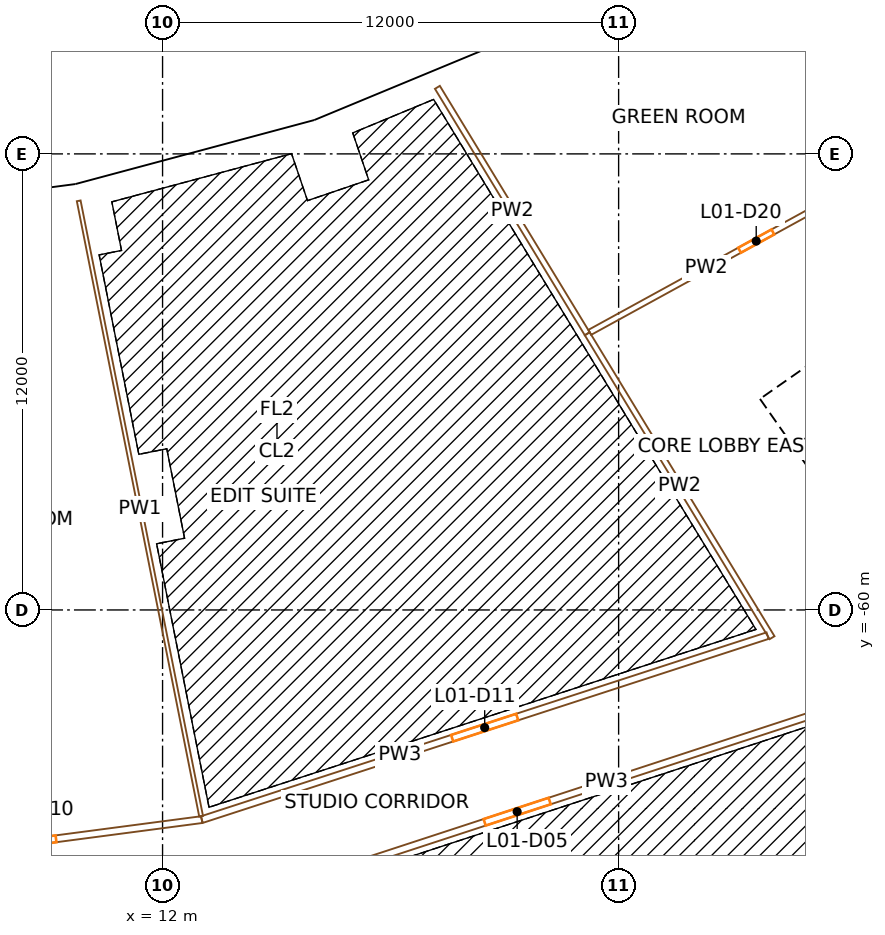
"""IFC4 building model, lengths in metres.
Left out: names, types, materials, properties, quantities, classifications, styles, units other than length and angle.
Written with IfcOpenShell. Run it as: python <this file> out.ifc"""

import sys

from ifc_helpers import new_model, si_unit, direction, frame, frame_2d, origin, origin_2d, place, context, subcontext, project, spatial, rectangle, extrude, element, fill, save


model = new_model("IFC4")
c1 = context("Model", 3, precision=1e-05, world=origin(), true_north=direction((0.0, 1.0)))
c2 = subcontext(c1, "Body", "Model", "MODEL_VIEW")
j1 = project(units=[si_unit("LENGTHUNIT", "METRE"), si_unit("PLANEANGLEUNIT", "RADIAN")], contexts=[c1])
p1 = place(None, origin())
s1 = spatial("IfcSite", under=j1, at=p1, CompositionType="ELEMENT")
p2 = place(p1, origin())
s2 = spatial("IfcBuilding", under=s1, at=p2, CompositionType="ELEMENT")
p3 = place(p2, frame((0.0, 0.0, 9.0)))
s3 = spatial("IfcBuildingStorey", under=s2, at=p3, CompositionType="ELEMENT", Elevation=9.0)
p4 = place(p3, frame((9.901, -49.775, 0.0), z_axis=(0.0, 0.0, 1.0), x_axis=(0.980785280403, 0.195090322016, 0.0)))
e1 = element("IfcColumn", 1, at=p4, inside=s3, PredefinedType="COLUMN", context=c2, shape_type="SweptSolid", body=[
    extrude(rectangle(XDim=1.1, YDim=1.3, at=origin_2d()), origin(), (0.0, 0.0, 1.0), 9.0),
])
p5 = place(p3, frame((11.364, -57.131, 0.0), z_axis=(0.0, 0.0, 1.0), x_axis=(0.980785280403, 0.195090322016, 0.0)))
e2 = element("IfcColumn", 2, at=p5, inside=s3, PredefinedType="COLUMN", context=c2, shape_type="SweptSolid", body=[
    extrude(rectangle(XDim=1.4, YDim=1.8, at=origin_2d()), origin(), (0.0, 0.0, 1.0), 9.0),
])
p6 = place(p3, frame((16.313, -48.057, 0.0), z_axis=(0.0, 0.0, 1.0), x_axis=(0.946930129495, 0.321439465303, 0.0)))
e3 = element("IfcColumn", 3, at=p6, inside=s3, PredefinedType="COLUMN", context=c2, shape_type="SweptSolid", body=[
    extrude(rectangle(XDim=1.1, YDim=1.3, at=origin_2d()), origin(), (0.0, 0.0, 1.0), 9.0),
])
p7 = place(p3, frame((18.724, -55.159, 0.0), z_axis=(0.0, 0.0, 1.0), x_axis=(0.946930129495, 0.321439465303, 0.0)))
e4 = element("IfcColumn", 4, at=p7, inside=s3, PredefinedType="COLUMN", context=c2, shape_type="SweptSolid", body=[
    extrude(rectangle(XDim=1.4, YDim=1.8, at=origin_2d()), origin(), (0.0, 0.0, 1.0), 9.0),
])
p8 = place(p3, frame((22.446, -45.516, 0.0), z_axis=(0.0, 0.0, 1.0), x_axis=(0.896872741533, 0.442288690219, 0.0)))
e5 = element("IfcColumn", 5, at=p8, inside=s3, PredefinedType="COLUMN", context=c2, shape_type="SweptSolid", body=[
    extrude(rectangle(XDim=1.1, YDim=1.3, at=origin_2d()), origin(), (0.0, 0.0, 1.0), 9.0),
])
p9 = place(p3, frame((25.763, -52.243, 0.0), z_axis=(0.0, 0.0, 1.0), x_axis=(0.896872741533, 0.442288690219, 0.0)))
e6 = element("IfcColumn", 6, at=p9, inside=s3, PredefinedType="COLUMN", context=c2, shape_type="SweptSolid", body=[
    extrude(rectangle(XDim=1.4, YDim=1.8, at=origin_2d()), origin(), (0.0, 0.0, 1.0), 9.0),
])
p10 = place(p3, frame((36.717, -66.337, 0.0), z_axis=(0.0, 0.0, 1.0), x_axis=(-0.573577477574, 0.819151315216, 0.0)))
e7 = element("IfcWall", 7, at=p10, inside=s3, PredefinedType="SHEAR", context=c2, shape_type="SweptSolid", body=[
    extrude(rectangle(XDim=14.8, YDim=0.9, at=frame_2d((7.4, 0.0))), origin(), (0.0, 0.0, 1.0), 8.6),
])
p11 = place(p10, frame((6.2, 0.0, 0.0)))
e8 = element("IfcOpeningElement", 8, at=p11, cuts=e7, PredefinedType="OPENING", context=c2, shape_type="SweptSolid", body=[
    extrude(rectangle(XDim=2.4, YDim=2.1, at=frame_2d((1.2, 1.05))), frame((0.0, 0.46, 0.0), z_axis=(0.0, -1.0, 0.0), x_axis=(1.0, 0.0, 0.0)), (0.0, 0.0, 1.0), 0.92),
])
p12 = place(p3, frame((28.854, -54.324, 0.0), z_axis=(0.0, 0.0, 1.0), x_axis=(0.819145767589, 0.573585400304, 0.0)))
e9 = element("IfcWall", 9, at=p12, inside=s3, PredefinedType="SHEAR", context=c2, shape_type="SweptSolid", body=[
    extrude(rectangle(XDim=15.045, YDim=0.9, at=frame_2d((7.523, 0.0))), origin(), (0.0, 0.0, 1.0), 8.6),
])
p13 = place(p12, frame((0.85, 0.0, 0.0)))
e10 = element("IfcOpeningElement", 10, at=p13, cuts=e9, PredefinedType="OPENING", context=c2, shape_type="SweptSolid", body=[
    extrude(rectangle(XDim=1.0, YDim=2.1, at=frame_2d((0.5, 1.05))), frame((0.0, 0.46, 0.0), z_axis=(0.0, -1.0, 0.0), x_axis=(1.0, 0.0, 0.0)), (0.0, 0.0, 1.0), 0.92),
])
p14 = place(p12, frame((3.575, 0.0, 0.0)))
e11 = element("IfcOpeningElement", 11, at=p14, cuts=e9, PredefinedType="OPENING", context=c2, shape_type="SweptSolid", body=[
    extrude(rectangle(XDim=1.0, YDim=2.1, at=frame_2d((0.5, 1.05))), frame((0.0, 0.46, 0.0), z_axis=(0.0, -1.0, 0.0), x_axis=(1.0, 0.0, 0.0)), (0.0, 0.0, 1.0), 0.92),
])
p15 = place(p12, frame((6.275, 0.0, 0.0)))
e12 = element("IfcOpeningElement", 12, at=p15, cuts=e9, PredefinedType="OPENING", context=c2, shape_type="SweptSolid", body=[
    extrude(rectangle(XDim=0.9, YDim=2.1, at=frame_2d((0.45, 1.05))), frame((0.0, 0.46, 0.0), z_axis=(0.0, -1.0, 0.0), x_axis=(1.0, 0.0, 0.0)), (0.0, 0.0, 1.0), 0.92),
])
p16 = place(p12, frame((13.495, 0.0, 0.0)))
e13 = element("IfcOpeningElement", 13, at=p16, cuts=e9, PredefinedType="OPENING", context=c2, shape_type="SweptSolid", body=[
    extrude(rectangle(XDim=1.1, YDim=2.1, at=frame_2d((0.55, 1.05))), frame((0.0, 0.46, 0.0), z_axis=(0.0, -1.0, 0.0), x_axis=(1.0, 0.0, 0.0)), (0.0, 0.0, 1.0), 0.92),
])
p17 = place(p3, frame((9.78, -49.011, 0.0), z_axis=(0.0, 0.0, 1.0), x_axis=(-0.991445350147, -0.130522479563, 0.0)))
e14 = element("IfcWall", 14, at=p17, inside=s3, PredefinedType="SOLIDWALL", context=c2, shape_type="SweptSolid", body=[
    extrude(rectangle(XDim=6.597, YDim=0.45, at=frame_2d((3.299, 0.0))), origin(), (0.0, 0.0, 1.0), 7.7),
])
p18 = place(p3, frame((16.007, -47.339, 0.0), z_axis=(0.0, 0.0, 1.0), x_axis=(-0.965926830738, -0.25881529642, 0.0)))
e15 = element("IfcWall", 15, at=p18, inside=s3, PredefinedType="SOLIDWALL", context=c2, shape_type="SweptSolid", body=[
    extrude(rectangle(XDim=6.419, YDim=0.45, at=frame_2d((3.209, 0.0))), origin(), (0.0, 0.0, 1.0), 7.7),
])
p19 = place(p3, frame((22.131, -44.81, 0.0), z_axis=(0.0, 0.0, 1.0), x_axis=(-0.923877459804, -0.382688436284, 0.0)))
e16 = element("IfcWall", 16, at=p19, inside=s3, PredefinedType="SOLIDWALL", context=c2, shape_type="SweptSolid", body=[
    extrude(rectangle(XDim=6.597, YDim=0.45, at=frame_2d((3.299, 0.0))), origin(), (0.0, 0.0, 1.0), 7.7),
])
p20 = place(p3, frame((4.369, -66.657, 0.0), z_axis=(0.0, 0.0, 1.0), x_axis=(0.991443260322, 0.130538352841, 0.0)))
e17 = element("IfcWall", 17, at=p20, inside=s3, PredefinedType="PARTITIONING", context=c2, shape_type="SweptSolid", body=[
    extrude(rectangle(XDim=8.738, YDim=0.18, at=frame_2d((4.369, 0.0))), origin(), (0.0, 0.0, 1.0), 7.6),
])
p21 = place(p20, frame((3.869, 0.0, 0.0)))
e18 = element("IfcOpeningElement", 18, at=p21, cuts=e17, PredefinedType="OPENING", context=c2, shape_type="SweptSolid", body=[
    extrude(rectangle(XDim=1.0, YDim=2.1, at=frame_2d((0.5, 1.05))), frame((0.0, 0.1, 0.0), z_axis=(0.0, -1.0, 0.0), x_axis=(1.0, 0.0, 0.0)), (0.0, 0.0, 1.0), 0.2),
])
p22 = place(p3, frame((9.793, -49.235, 0.0), z_axis=(0.0, 0.0, 1.0), x_axis=(0.195089444663, -0.980785454919, 0.0)))
e19 = element("IfcWall", 19, at=p22, inside=s3, PredefinedType="PARTITIONING", context=c2, shape_type="SweptSolid", body=[
    extrude(rectangle(XDim=16.51, YDim=0.1, at=frame_2d((8.255, 0.0))), origin(), (0.0, 0.0, 1.0), 7.6),
])
p23 = place(p3, frame((13.032, -65.516, 0.0), z_axis=(0.0, 0.0, 1.0), x_axis=(0.950996699022, 0.309201032419, 0.0)))
e20 = element("IfcWall", 20, at=p23, inside=s3, PredefinedType="PARTITIONING", context=c2, shape_type="SweptSolid", body=[
    extrude(rectangle(XDim=15.654, YDim=0.18, at=frame_2d((7.827, 0.0))), origin(), (0.0, 0.0, 1.0), 7.6),
])
p24 = place(p23, frame((6.927, 0.0, 0.0)))
e21 = element("IfcOpeningElement", 21, at=p24, cuts=e20, PredefinedType="OPENING", context=c2, shape_type="SweptSolid", body=[
    extrude(rectangle(XDim=1.8, YDim=2.1, at=frame_2d((0.9, 1.05))), frame((0.0, 0.1, 0.0), z_axis=(0.0, -1.0, 0.0), x_axis=(1.0, 0.0, 0.0)), (0.0, 0.0, 1.0), 0.2),
])
p25 = place(p3, frame((29.16, -62.744, 0.0), z_axis=(0.0, 0.0, 1.0), x_axis=(-0.95037928892, -0.31109356662, 0.0)))
e22 = element("IfcWall", 22, at=p25, inside=s3, PredefinedType="PARTITIONING", context=c2, shape_type="SweptSolid", body=[
    extrude(rectangle(XDim=16.477, YDim=0.18, at=frame_2d((8.239, 0.0))), origin(), (0.0, 0.0, 1.0), 7.6),
])
p26 = place(p25, frame((7.339, 0.0, 0.0)))
e23 = element("IfcOpeningElement", 23, at=p26, cuts=e22, PredefinedType="OPENING", context=c2, shape_type="SweptSolid", body=[
    extrude(rectangle(XDim=1.8, YDim=2.4, at=frame_2d((0.9, 1.2))), frame((0.0, 0.1, 0.0), z_axis=(0.0, -1.0, 0.0), x_axis=(1.0, 0.0, 0.0)), (0.0, 0.0, 1.0), 0.2),
])
p27 = place(p3, frame((19.231, -46.249, 0.0), z_axis=(0.0, 0.0, 1.0), x_axis=(0.519582509181, -0.854420280748, 0.0)))
e24 = element("IfcWall", 24, at=p27, inside=s3, PredefinedType="PARTITIONING", context=c2, shape_type="SweptSolid", body=[
    extrude(rectangle(XDim=7.588, YDim=0.15, at=frame_2d((3.794, 0.0))), origin(), (0.0, 0.0, 1.0), 7.6),
])
p28 = place(p3, frame((23.174, -52.732, 0.0), z_axis=(0.0, 0.0, 1.0), x_axis=(0.519584464565, -0.854419091654, 0.0)))
e25 = element("IfcWall", 25, at=p28, inside=s3, PredefinedType="PARTITIONING", context=c2, shape_type="SweptSolid", body=[
    extrude(rectangle(XDim=9.36, YDim=0.15, at=frame_2d((4.68, 0.0))), origin(), (0.0, 0.0, 1.0), 7.6),
])
p29 = place(p3, frame((23.24, -52.697, 0.0), z_axis=(0.0, 0.0, 1.0), x_axis=(0.876826033283, 0.480807765492, 0.0)))
e26 = element("IfcWall", 26, at=p29, inside=s3, PredefinedType="PARTITIONING", context=c2, shape_type="SweptSolid", body=[
    extrude(rectangle(XDim=9.991, YDim=0.15, at=frame_2d((4.996, 0.0))), origin(), (0.0, 0.0, 1.0), 7.6),
])
p30 = place(p29, frame((4.496, 0.0, 0.0)))
e27 = element("IfcOpeningElement", 27, at=p30, cuts=e26, PredefinedType="OPENING", context=c2, shape_type="SweptSolid", body=[
    extrude(rectangle(XDim=1.0, YDim=2.1, at=frame_2d((0.5, 1.05))), frame((0.0, 0.085, 0.0), z_axis=(0.0, -1.0, 0.0), x_axis=(1.0, 0.0, 0.0)), (0.0, 0.0, 1.0), 0.17),
])
p31 = place(p3, frame((27.89, -41.74, 0.0), z_axis=(0.0, 0.0, 1.0), x_axis=(0.555569023768, -0.831470420297, 0.0)))
e28 = element("IfcWall", 28, at=p31, inside=s3, PredefinedType="PARTITIONING", context=c2, shape_type="SweptSolid", body=[
    extrude(rectangle(XDim=7.325, YDim=0.1, at=frame_2d((3.663, 0.0))), origin(), (0.0, 0.0, 1.0), 7.6),
])
p32 = place(p26, origin())
e29 = element("IfcDoor", 29, at=p32, inside=s3, OperationType="DOUBLE_DOOR_SINGLE_SWING", PredefinedType="DOOR", context=c2, shape_type="SweptSolid", body=[
    extrude(rectangle(XDim=1.8, YDim=2.4, at=frame_2d((0.9, 1.2))), frame((0.0, 0.025, 0.0), z_axis=(0.0, -1.0, 0.0), x_axis=(1.0, 0.0, 0.0)), (0.0, 0.0, 1.0), 0.05),
])
fill(e23, e29)
p33 = place(p21, origin())
e30 = element("IfcDoor", 30, at=p33, inside=s3, OperationType="SINGLE_SWING_RIGHT", PredefinedType="DOOR", context=c2, shape_type="SweptSolid", body=[
    extrude(rectangle(XDim=1.0, YDim=2.1, at=frame_2d((0.5, 1.05))), frame((0.0, 0.025, 0.0), z_axis=(0.0, -1.0, 0.0), x_axis=(1.0, 0.0, 0.0)), (0.0, 0.0, 1.0), 0.05),
])
fill(e18, e30)
p34 = place(p24, origin())
e31 = element("IfcDoor", 31, at=p34, inside=s3, OperationType="DOUBLE_DOOR_SINGLE_SWING", PredefinedType="DOOR", context=c2, shape_type="SweptSolid", body=[
    extrude(rectangle(XDim=1.8, YDim=2.1, at=frame_2d((0.9, 1.05))), frame((0.0, 0.025, 0.0), z_axis=(0.0, -1.0, 0.0), x_axis=(1.0, 0.0, 0.0)), (0.0, 0.0, 1.0), 0.05),
])
fill(e21, e31)
p35 = place(p30, origin())
e32 = element("IfcDoor", 32, at=p35, inside=s3, OperationType="SINGLE_SWING_RIGHT", PredefinedType="DOOR", context=c2, shape_type="SweptSolid", body=[
    extrude(rectangle(XDim=1.0, YDim=2.1, at=frame_2d((0.5, 1.05))), frame((0.0, 0.025, 0.0), z_axis=(0.0, -1.0, 0.0), x_axis=(1.0, 0.0, 0.0)), (0.0, 0.0, 1.0), 0.05),
])
fill(e27, e32)
save(model, sys.argv[1])
